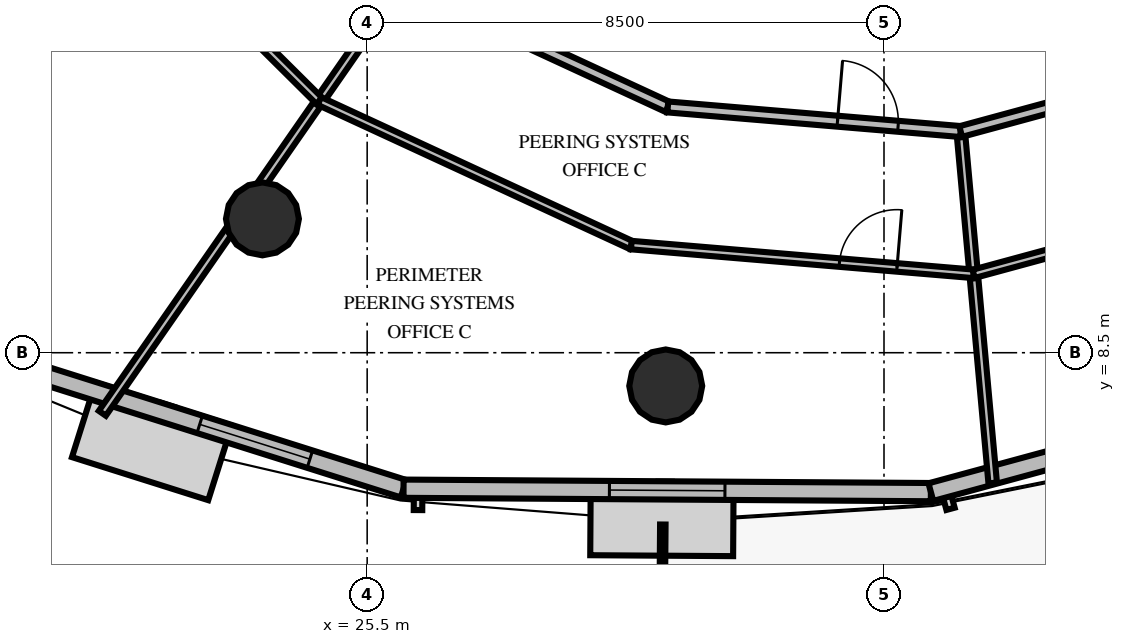
"""IFC4 building model, lengths in metres.
Left out: names, types, materials, properties, quantities, classifications, styles, units other than length and angle.
Written with IfcOpenShell. Run it as: python <this file> out.ifc"""

import sys

from ifc_helpers import new_model, si_unit, direction, frame, frame_2d, origin, origin_2d, place, context, subcontext, project, spatial, rectangle, circle, extrude, element, fill, save


model = new_model("IFC4")
c1 = context("Model", 3, precision=1e-05, world=origin(), true_north=direction((0.0, 1.0)))
c2 = subcontext(c1, "Body", "Model", "MODEL_VIEW")
j1 = project(units=[si_unit("LENGTHUNIT", "METRE"), si_unit("PLANEANGLEUNIT", "RADIAN")], contexts=[c1])
p1 = place(None, origin())
s1 = spatial("IfcSite", under=j1, at=p1, CompositionType="ELEMENT")
p2 = place(p1, origin())
s2 = spatial("IfcBuilding", under=s1, at=p2, CompositionType="ELEMENT")
p3 = place(p2, frame((0.0, 0.0, 97.8)))
s3 = spatial("IfcBuildingStorey", under=s2, at=p3, CompositionType="ELEMENT", Elevation=97.8)
for number, where, z_axis, x_axis in (
    (1, (23.778, 10.701, 0.0), (0.0, 0.0, 1.0), (1.0, 0.0, 0.0)),
    (2, (30.41, 7.954, 0.0), (0.0, 0.0, 1.0), (1.0, 0.0, 0.0)),
):
    element("IfcColumn", number, at=place(p3, frame(where, z_axis=z_axis, x_axis=x_axis)), inside=s3, PredefinedType="COLUMN", context=c2, shape_type="SweptSolid", body=[
        extrude(circle(Radius=0.6, at=origin_2d()), origin(), (0.0, 0.0, 1.0), 4.0),
    ])
p4 = place(p3, frame((18.378, 8.7, 0.0), z_axis=(0.0, 0.0, 1.0), x_axis=(0.953619577743, -0.30101445305, 0.0)))
e3 = element("IfcWall", 3, at=p4, inside=s3, PredefinedType="SOLIDWALL", context=c2, shape_type="SweptSolid", body=[
    extrude(rectangle(XDim=8.095, YDim=0.3, at=frame_2d((4.048, 0.0))), origin(), (0.0, 0.0, 1.0), 2.9),
])
p5 = place(p4, frame((4.58, 0.0, 0.8)))
e4 = element("IfcOpeningElement", 4, at=p5, cuts=e3, PredefinedType="OPENING", context=c2, shape_type="SweptSolid", body=[
    extrude(rectangle(XDim=1.9, YDim=1.95, at=frame_2d((0.95, 0.975))), frame((0.0, 0.16, 0.0), z_axis=(0.0, -1.0, 0.0), x_axis=(1.0, 0.0, 0.0)), (0.0, 0.0, 1.0), 0.32),
])
p6 = place(p3, frame((26.098, 6.264, 0.0), z_axis=(0.0, 0.0, 1.0), x_axis=(0.999979041109, -0.006474360417, 0.0)))
e5 = element("IfcWall", 5, at=p6, inside=s3, PredefinedType="SOLIDWALL", context=c2, shape_type="SweptSolid", body=[
    extrude(rectangle(XDim=8.673, YDim=0.3, at=frame_2d((4.336, 0.0))), origin(), (0.0, 0.0, 1.0), 2.9),
])
p7 = place(p6, frame((3.386, 0.0, 0.8)))
e6 = element("IfcOpeningElement", 6, at=p7, cuts=e5, PredefinedType="OPENING", context=c2, shape_type="SweptSolid", body=[
    extrude(rectangle(XDim=1.9, YDim=1.95, at=frame_2d((0.95, 0.975))), frame((0.0, 0.16, 0.0), z_axis=(0.0, -1.0, 0.0), x_axis=(1.0, 0.0, 0.0)), (0.0, 0.0, 1.0), 0.32),
])
p8 = place(p3, frame((34.771, 6.208, 0.0), z_axis=(0.0, 0.0, 1.0), x_axis=(0.965015591798, 0.26219250101, 0.0)))
e7 = element("IfcWall", 7, at=p8, inside=s3, PredefinedType="SOLIDWALL", context=c2, shape_type="SweptSolid", body=[
    extrude(rectangle(XDim=8.891, YDim=0.3, at=frame_2d((4.445, 0.0))), origin(), (0.0, 0.0, 1.0), 2.9),
])
p9 = place(p8, frame((6.43, 0.0, 0.0)))
e8 = element("IfcOpeningElement", 8, at=p9, cuts=e7, PredefinedType="OPENING", context=c2, shape_type="SweptSolid", body=[
    extrude(rectangle(XDim=1.05, YDim=2.15, at=frame_2d((0.525, 1.075))), frame((0.0, 0.16, 0.0), z_axis=(0.0, -1.0, 0.0), x_axis=(1.0, 0.0, 0.0)), (0.0, 0.0, 1.0), 0.32),
])
p10 = place(p3, frame((26.056, 14.57, 0.0), z_axis=(0.0, 0.0, 1.0), x_axis=(-0.570709473436, -0.821152054695, 0.0)))
e9 = element("IfcWall", 9, at=p10, inside=s3, PredefinedType="PARTITIONING", context=c2, shape_type="SweptSolid", body=[
    extrude(rectangle(XDim=8.605, YDim=0.14, at=frame_2d((4.302, 0.0))), origin(), (0.0, 0.0, 1.0), 2.8),
])
p11 = place(p3, frame((20.705, 16.621, 0.0), z_axis=(0.0, 0.0, 1.0), x_axis=(0.709586813131, -0.70461802037, 0.0)))
e10 = element("IfcWall", 10, at=p11, inside=s3, PredefinedType="PARTITIONING", context=c2, shape_type="SweptSolid", body=[
    extrude(rectangle(XDim=5.65, YDim=0.14, at=frame_2d((2.825, 0.0))), origin(), (0.0, 0.0, 1.0), 2.8),
])
p12 = place(p11, frame((2.35, 0.0, 0.0)))
e11 = element("IfcOpeningElement", 11, at=p12, cuts=e10, PredefinedType="OPENING", context=c2, shape_type="SweptSolid", body=[
    extrude(rectangle(XDim=0.95, YDim=2.15, at=frame_2d((0.475, 1.075))), frame((0.0, 0.08, 0.0), z_axis=(0.0, -1.0, 0.0), x_axis=(1.0, 0.0, 0.0)), (0.0, 0.0, 1.0), 0.16),
])
p13 = place(p3, frame((35.262, 12.137, 0.0), z_axis=(0.0, 0.0, 1.0), x_axis=(0.090615399913, -0.995885961995, 0.0)))
e12 = element("IfcWall", 12, at=p13, inside=s3, PredefinedType="PARTITIONING", context=c2, shape_type="SweptSolid", body=[
    extrude(rectangle(XDim=5.803, YDim=0.14, at=frame_2d((2.902, 0.0))), origin(), (0.0, 0.0, 1.0), 2.8),
])
p14 = place(p3, frame((26.056, 14.57, 0.0), z_axis=(0.0, 0.0, 1.0), x_axis=(0.907770094926, -0.419468061666, 0.0)))
e13 = element("IfcWall", 13, at=p14, inside=s3, PredefinedType="PARTITIONING", context=c2, shape_type="SweptSolid", body=[
    extrude(rectangle(XDim=4.834, YDim=0.18, at=frame_2d((2.417, 0.0))), origin(), (0.0, 0.0, 1.0), 2.8),
])
p15 = place(p3, frame((30.444, 12.542, 0.0), z_axis=(0.0, 0.0, 1.0), x_axis=(0.996492970022, -0.083676524164, 0.0)))
e14 = element("IfcWall", 14, at=p15, inside=s3, PredefinedType="PARTITIONING", context=c2, shape_type="SweptSolid", body=[
    extrude(rectangle(XDim=4.834, YDim=0.18, at=frame_2d((2.417, 0.0))), origin(), (0.0, 0.0, 1.0), 2.8),
])
p16 = place(p15, frame((2.801, 0.0, 0.0)))
e15 = element("IfcOpeningElement", 15, at=p16, cuts=e14, PredefinedType="OPENING", context=c2, shape_type="SweptSolid", body=[
    extrude(rectangle(XDim=1.0, YDim=2.15, at=frame_2d((0.5, 1.075))), frame((0.0, 0.1, 0.0), z_axis=(0.0, -1.0, 0.0), x_axis=(1.0, 0.0, 0.0)), (0.0, 0.0, 1.0), 0.2),
])
p17 = place(p3, frame((24.715, 12.64, 0.0), z_axis=(0.0, 0.0, 1.0), x_axis=(0.907777197452, -0.41945269076, 0.0)))
e16 = element("IfcWall", 16, at=p17, inside=s3, PredefinedType="PARTITIONING", context=c2, shape_type="SweptSolid", body=[
    extrude(rectangle(XDim=5.65, YDim=0.14, at=frame_2d((2.825, 0.0))), origin(), (0.0, 0.0, 1.0), 2.8),
])
p18 = place(p3, frame((29.844, 10.27, 0.0), z_axis=(0.0, 0.0, 1.0), x_axis=(0.996495215898, -0.083649774009, 0.0)))
e17 = element("IfcWall", 17, at=p18, inside=s3, PredefinedType="PARTITIONING", context=c2, shape_type="SweptSolid", body=[
    extrude(rectangle(XDim=5.65, YDim=0.14, at=frame_2d((2.825, 0.0))), origin(), (0.0, 0.0, 1.0), 2.8),
])
p19 = place(p18, frame((3.435, 0.0, 0.0)))
e18 = element("IfcOpeningElement", 18, at=p19, cuts=e17, PredefinedType="OPENING", context=c2, shape_type="SweptSolid", body=[
    extrude(rectangle(XDim=0.95, YDim=2.15, at=frame_2d((0.475, 1.075))), frame((0.0, 0.08, 0.0), z_axis=(0.0, -1.0, 0.0), x_axis=(1.0, 0.0, 0.0)), (0.0, 0.0, 1.0), 0.16),
])
p20 = place(p3, frame((35.262, 12.137, 0.0), z_axis=(0.0, 0.0, 1.0), x_axis=(0.965010471878, 0.262211344463, 0.0)))
e19 = element("IfcWall", 19, at=p20, inside=s3, PredefinedType="PARTITIONING", context=c2, shape_type="SweptSolid", body=[
    extrude(rectangle(XDim=4.834, YDim=0.18, at=frame_2d((2.417, 0.0))), origin(), (0.0, 0.0, 1.0), 2.8),
])
p21 = place(p20, frame((2.801, 0.0, 0.0)))
e20 = element("IfcOpeningElement", 20, at=p21, cuts=e19, PredefinedType="OPENING", context=c2, shape_type="SweptSolid", body=[
    extrude(rectangle(XDim=1.0, YDim=2.15, at=frame_2d((0.5, 1.075))), frame((0.0, 0.1, 0.0), z_axis=(0.0, -1.0, 0.0), x_axis=(1.0, 0.0, 0.0)), (0.0, 0.0, 1.0), 0.2),
])
p22 = place(p3, frame((35.475, 9.797, 0.0), z_axis=(0.0, 0.0, 1.0), x_axis=(0.96501961214, 0.262177703446, 0.0)))
e21 = element("IfcWall", 21, at=p22, inside=s3, PredefinedType="PARTITIONING", context=c2, shape_type="SweptSolid", body=[
    extrude(rectangle(XDim=5.651, YDim=0.14, at=frame_2d((2.825, 0.0))), origin(), (0.0, 0.0, 1.0), 2.8),
])
p23 = place(p22, frame((3.435, 0.0, 0.0)))
e22 = element("IfcOpeningElement", 22, at=p23, cuts=e21, PredefinedType="OPENING", context=c2, shape_type="SweptSolid", body=[
    extrude(rectangle(XDim=0.95, YDim=2.15, at=frame_2d((0.475, 1.075))), frame((0.0, 0.08, 0.0), z_axis=(0.0, -1.0, 0.0), x_axis=(1.0, 0.0, 0.0)), (0.0, 0.0, 1.0), 0.16),
])
p24 = place(p5, origin())
e23 = element("IfcWindow", 23, at=p24, inside=s3, PartitioningType="SINGLE_PANEL", PredefinedType="WINDOW", context=c2, shape_type="SweptSolid", body=[
    extrude(rectangle(XDim=1.9, YDim=1.95, at=frame_2d((0.95, 0.975))), frame((0.0, 0.03, 0.0), z_axis=(0.0, -1.0, 0.0), x_axis=(1.0, 0.0, 0.0)), (0.0, 0.0, 1.0), 0.06),
])
fill(e4, e23)
p25 = place(p7, origin())
e24 = element("IfcWindow", 24, at=p25, inside=s3, PartitioningType="SINGLE_PANEL", PredefinedType="WINDOW", context=c2, shape_type="SweptSolid", body=[
    extrude(rectangle(XDim=1.9, YDim=1.95, at=frame_2d((0.95, 0.975))), frame((0.0, 0.03, 0.0), z_axis=(0.0, -1.0, 0.0), x_axis=(1.0, 0.0, 0.0)), (0.0, 0.0, 1.0), 0.06),
])
fill(e6, e24)
p26 = place(p16, origin())
e25 = element("IfcDoor", 25, at=p26, inside=s3, OperationType="SINGLE_SWING_LEFT", PredefinedType="DOOR", context=c2, shape_type="SweptSolid", body=[
    extrude(rectangle(XDim=1.0, YDim=2.15, at=frame_2d((0.5, 1.075))), frame((0.0, 0.025, 0.0), z_axis=(0.0, -1.0, 0.0), x_axis=(1.0, 0.0, 0.0)), (0.0, 0.0, 1.0), 0.05),
])
fill(e15, e25)
p27 = place(p19, origin())
e26 = element("IfcDoor", 26, at=p27, inside=s3, OperationType="SINGLE_SWING_RIGHT", PredefinedType="DOOR", context=c2, shape_type="SweptSolid", body=[
    extrude(rectangle(XDim=0.95, YDim=2.15, at=frame_2d((0.475, 1.075))), frame((0.0, 0.025, 0.0), z_axis=(0.0, -1.0, 0.0), x_axis=(1.0, 0.0, 0.0)), (0.0, 0.0, 1.0), 0.05),
])
fill(e18, e26)
save(model, sys.argv[1])
